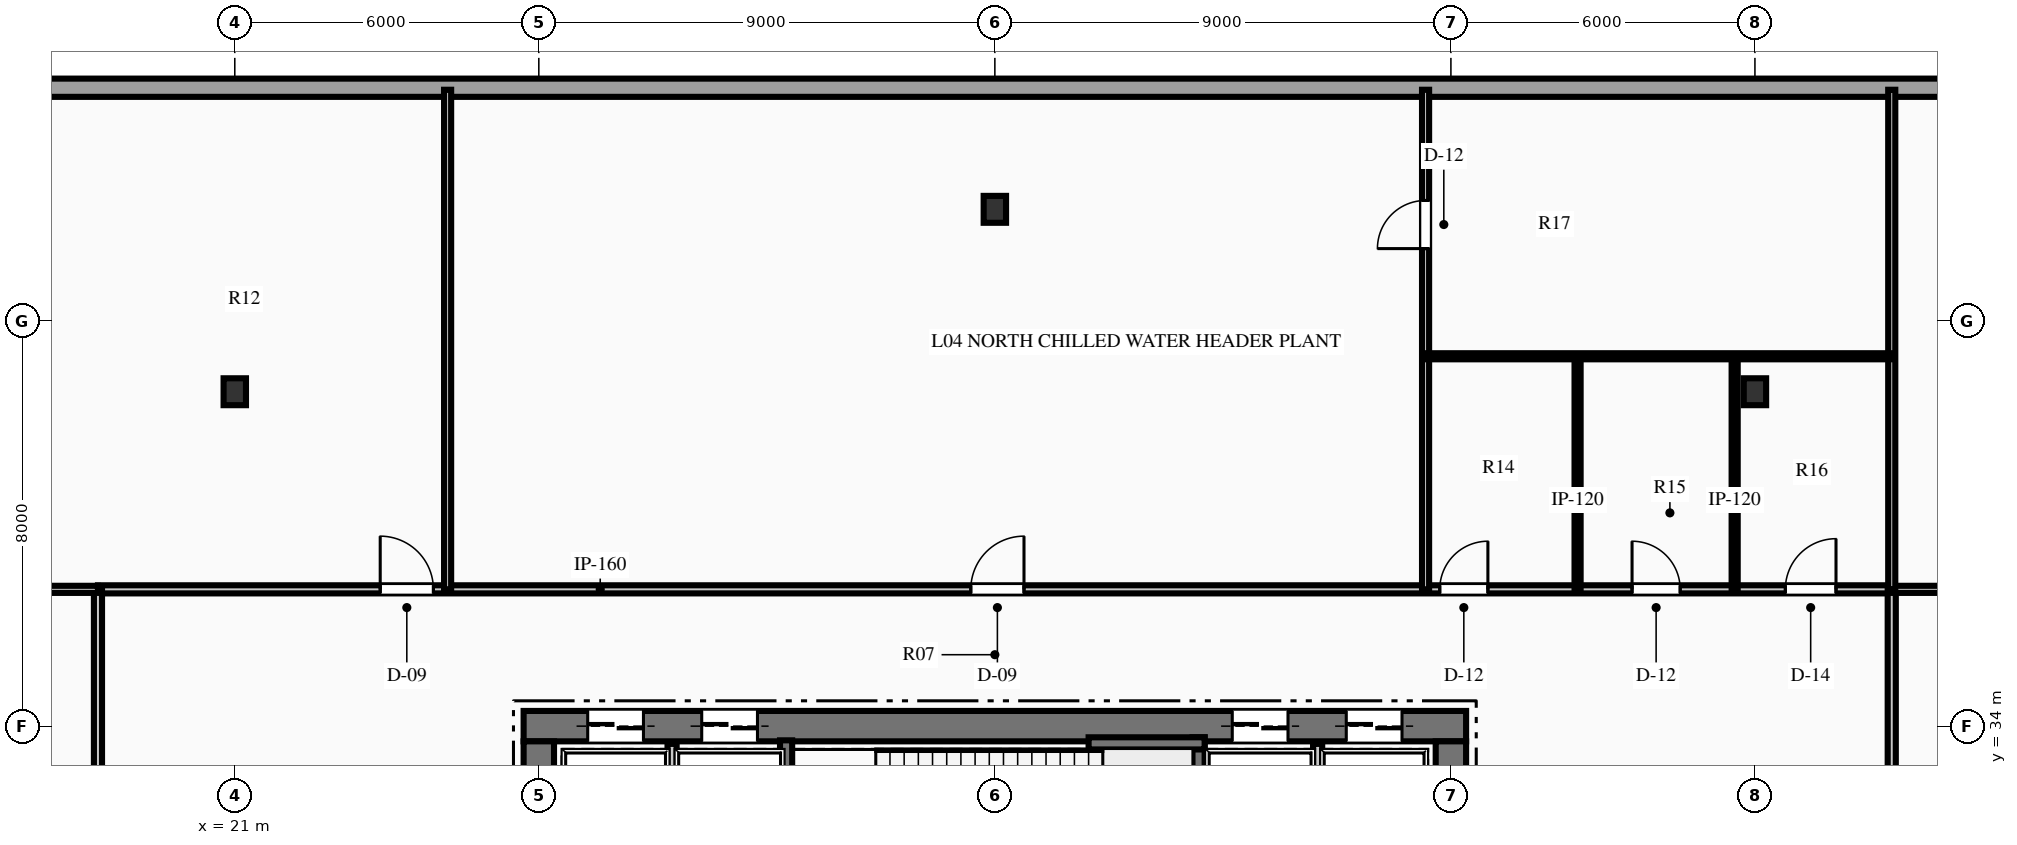
"""IFC4 building model, lengths in metres.
Left out: names, types, materials, properties, quantities, classifications, styles, units other than length and angle.
Written with IfcOpenShell. Run it as: python <this file> out.ifc"""

import sys

from ifc_helpers import new_model, si_unit, direction, frame, frame_2d, origin, origin_2d, place, context, subcontext, project, spatial, rectangle, i_section, extrude, element, fill, save


model = new_model("IFC4")
c1 = context("Model", 3, precision=1e-05, world=origin(), true_north=direction((0.0, 1.0)))
c2 = subcontext(c1, "Body", "Model", "MODEL_VIEW")
j1 = project(units=[si_unit("LENGTHUNIT", "METRE"), si_unit("PLANEANGLEUNIT", "RADIAN")], contexts=[c1])
p1 = place(None, origin())
s1 = spatial("IfcSite", under=j1, at=p1, CompositionType="ELEMENT")
p2 = place(p1, origin())
s2 = spatial("IfcBuilding", under=s1, at=p2, CompositionType="ELEMENT")
p3 = place(p2, frame((0.0, 0.0, 22.2)))
s3 = spatial("IfcBuildingStorey", under=s2, at=p3, CompositionType="ELEMENT", Elevation=22.2)
p4 = place(p3, frame((26.7, 34.0, 0.0), z_axis=(0.0, 0.0, 1.0), x_axis=(1.0, 0.0, 0.0)))
e1 = element("IfcWall", 1, at=p4, inside=s3, PredefinedType="SHEAR", context=c2, shape_type="SweptSolid", body=[
    extrude(rectangle(XDim=18.6, YDim=0.6, at=frame_2d((9.3, 0.0))), origin(), (0.0, 0.0, 1.0), 6.0),
])
p5 = place(p4, frame((1.265, 0.0, 0.0)))
e2 = element("IfcOpeningElement", 2, at=p5, cuts=e1, PredefinedType="OPENING", context=c2, shape_type="SweptSolid", body=[
    extrude(rectangle(XDim=1.1, YDim=2.15, at=frame_2d((0.55, 1.075))), frame((0.0, 0.31, 0.0), z_axis=(0.0, -1.0, 0.0), x_axis=(1.0, 0.0, 0.0)), (0.0, 0.0, 1.0), 0.62),
])
p6 = place(p4, frame((3.515, 0.0, 0.0)))
e3 = element("IfcOpeningElement", 3, at=p6, cuts=e1, PredefinedType="OPENING", context=c2, shape_type="SweptSolid", body=[
    extrude(rectangle(XDim=1.1, YDim=2.15, at=frame_2d((0.55, 1.075))), frame((0.0, 0.31, 0.0), z_axis=(0.0, -1.0, 0.0), x_axis=(1.0, 0.0, 0.0)), (0.0, 0.0, 1.0), 0.62),
])
p7 = place(p4, frame((13.985, 0.0, 0.0)))
e4 = element("IfcOpeningElement", 4, at=p7, cuts=e1, PredefinedType="OPENING", context=c2, shape_type="SweptSolid", body=[
    extrude(rectangle(XDim=1.1, YDim=2.15, at=frame_2d((0.55, 1.075))), frame((0.0, 0.31, 0.0), z_axis=(0.0, -1.0, 0.0), x_axis=(1.0, 0.0, 0.0)), (0.0, 0.0, 1.0), 0.62),
])
p8 = place(p4, frame((16.235, 0.0, 0.0)))
e5 = element("IfcOpeningElement", 5, at=p8, cuts=e1, PredefinedType="OPENING", context=c2, shape_type="SweptSolid", body=[
    extrude(rectangle(XDim=1.1, YDim=2.15, at=frame_2d((0.55, 1.075))), frame((0.0, 0.31, 0.0), z_axis=(0.0, -1.0, 0.0), x_axis=(1.0, 0.0, 0.0)), (0.0, 0.0, 1.0), 0.62),
])
p9 = place(p3, frame((27.0, 18.3, 0.0), z_axis=(0.0, 0.0, 1.0), x_axis=(0.0, 1.0, 0.0)))
e6 = element("IfcWall", 6, at=p9, inside=s3, PredefinedType="SHEAR", context=c2, shape_type="SweptSolid", body=[
    extrude(rectangle(XDim=15.4, YDim=0.6, at=frame_2d((7.7, 0.0))), origin(), (0.0, 0.0, 1.0), 6.0),
])
p10 = place(p9, frame((9.94, 0.0, 0.0)))
e7 = element("IfcOpeningElement", 7, at=p10, cuts=e6, PredefinedType="OPENING", context=c2, shape_type="SweptSolid", body=[
    extrude(rectangle(XDim=1.4, YDim=2.2, at=frame_2d((0.7, 1.1))), frame((0.0, 0.31, 0.0), z_axis=(0.0, -1.0, 0.0), x_axis=(1.0, 0.0, 0.0)), (0.0, 0.0, 1.0), 0.62),
])
p11 = place(p3, frame((45.0, 18.3, 0.0), z_axis=(0.0, 0.0, 1.0), x_axis=(0.0, 1.0, 0.0)))
e8 = element("IfcWall", 8, at=p11, inside=s3, PredefinedType="SHEAR", context=c2, shape_type="SweptSolid", body=[
    extrude(rectangle(XDim=15.4, YDim=0.6, at=frame_2d((7.7, 0.0))), origin(), (0.0, 0.0, 1.0), 6.0),
])
p12 = place(p11, frame((9.94, 0.0, 0.0)))
e9 = element("IfcOpeningElement", 9, at=p12, cuts=e8, PredefinedType="OPENING", context=c2, shape_type="SweptSolid", body=[
    extrude(rectangle(XDim=1.4, YDim=2.2, at=frame_2d((0.7, 1.1))), frame((0.0, 0.31, 0.0), z_axis=(0.0, -1.0, 0.0), x_axis=(1.0, 0.0, 0.0)), (0.0, 0.0, 1.0), 0.62),
])
p13 = place(p3, frame((31.88, 29.93, 0.0), z_axis=(0.0, 0.0, 1.0), x_axis=(0.0, 1.0, 0.0)))
e10 = element("IfcWall", 10, at=p13, inside=s3, PredefinedType="SHEAR", context=c2, shape_type="SweptSolid", body=[
    extrude(rectangle(XDim=3.79, YDim=0.24, at=frame_2d((1.895, 0.0))), origin(), (0.0, 0.0, 1.0), 6.0),
])
p14 = place(p3, frame((40.02, 29.93, 0.0), z_axis=(0.0, 0.0, 1.0), x_axis=(0.0, 1.0, 0.0)))
e11 = element("IfcWall", 11, at=p14, inside=s3, PredefinedType="SHEAR", context=c2, shape_type="SweptSolid", body=[
    extrude(rectangle(XDim=3.85, YDim=0.24, at=frame_2d((1.925, 0.0))), origin(), (0.0, 0.0, 1.0), 6.0),
])
p15 = place(p3, frame((37.85, 33.66, 0.0), z_axis=(0.0, 0.0, 1.0), x_axis=(1.0, 0.0, 0.0)))
e12 = element("IfcWall", 12, at=p15, inside=s3, PredefinedType="SHEAR", context=c2, shape_type="SweptSolid", body=[
    extrude(rectangle(XDim=2.29, YDim=0.24, at=frame_2d((1.145, 0.0))), origin(), (0.0, 0.0, 1.0), 6.0),
])
for number, where, z_axis, x_axis in (
    (13, (21.0, 40.6, 0.0), (0.0, 0.0, 1.0), (1.0, 0.0, 0.0)),
    (14, (51.0, 40.6, 0.0), (0.0, 0.0, 1.0), (1.0, 0.0, 0.0)),
    (15, (36.0, 44.2, 0.0), (0.0, 0.0, 1.0), (1.0, 0.0, 0.0)),
):
    element("IfcColumn", number, at=place(p3, frame(where, z_axis=z_axis, x_axis=x_axis)), inside=s3, PredefinedType="COLUMN", context=c2, shape_type="SweptSolid", body=[
        extrude(i_section(OverallWidth=0.442, OverallDepth=0.531, WebThickness=0.066, FlangeThickness=0.106, at=origin_2d()), origin(), (0.0, 0.0, 1.0), 6.0),
    ])
p16 = place(p3, frame((12.2, 46.6, 0.0), z_axis=(0.0, 0.0, 1.0), x_axis=(1.0, 0.0, 0.0)))
e16 = element("IfcWall", 16, at=p16, inside=s3, PredefinedType="STANDARD", context=c2, shape_type="SweptSolid", body=[
    extrude(rectangle(XDim=47.6, YDim=0.36, at=frame_2d((23.8, 0.0))), origin(), (0.0, 0.0, 1.0), 5.59),
])
for number, where, z_axis, x_axis in (
    (17, (29.63, 29.9, 0.0), (0.0, 0.0, 1.0), (0.0, 1.0, 0.0)),
    (18, (42.37, 29.9, 0.0), (0.0, 0.0, 1.0), (0.0, 1.0, 0.0)),
):
    element("IfcWall", number, at=place(p3, frame(where, z_axis=z_axis, x_axis=x_axis)), inside=s3, PredefinedType="PARTITIONING", context=c2, shape_type="SweptSolid", body=[
        extrude(rectangle(XDim=3.75, YDim=0.18, at=frame_2d((1.875, 0.0))), origin(), (0.0, 0.0, 1.0), 5.59),
    ])
p17 = place(p3, frame((18.3, 36.7, 0.0), z_axis=(0.0, 0.0, 1.0), x_axis=(1.0, 0.0, 0.0)))
e19 = element("IfcWall", 19, at=p17, inside=s3, PredefinedType="PARTITIONING", context=c2, shape_type="SweptSolid", body=[
    extrude(rectangle(XDim=35.4, YDim=0.16, at=frame_2d((17.7, 0.0))), origin(), (0.0, 0.0, 1.0), 5.59),
])
p18 = place(p17, frame((5.57, 0.0, 0.0)))
e20 = element("IfcOpeningElement", 20, at=p18, cuts=e19, PredefinedType="OPENING", context=c2, shape_type="SweptSolid", body=[
    extrude(rectangle(XDim=1.05, YDim=2.15, at=frame_2d((0.525, 1.075))), frame((0.0, 0.09, 0.0), z_axis=(0.0, -1.0, 0.0), x_axis=(1.0, 0.0, 0.0)), (0.0, 0.0, 1.0), 0.18),
])
p19 = place(p17, frame((17.225, 0.0, 0.0)))
e21 = element("IfcOpeningElement", 21, at=p19, cuts=e19, PredefinedType="OPENING", context=c2, shape_type="SweptSolid", body=[
    extrude(rectangle(XDim=1.05, YDim=2.15, at=frame_2d((0.525, 1.075))), frame((0.0, 0.09, 0.0), z_axis=(0.0, -1.0, 0.0), x_axis=(1.0, 0.0, 0.0)), (0.0, 0.0, 1.0), 0.18),
])
p20 = place(p17, frame((26.48, 0.0, 0.0)))
e22 = element("IfcOpeningElement", 22, at=p20, cuts=e19, PredefinedType="OPENING", context=c2, shape_type="SweptSolid", body=[
    extrude(rectangle(XDim=0.95, YDim=2.15, at=frame_2d((0.475, 1.075))), frame((0.0, 0.09, 0.0), z_axis=(0.0, -1.0, 0.0), x_axis=(1.0, 0.0, 0.0)), (0.0, 0.0, 1.0), 0.18),
])
p21 = place(p17, frame((30.275, 0.0, 0.0)))
e23 = element("IfcOpeningElement", 23, at=p21, cuts=e19, PredefinedType="OPENING", context=c2, shape_type="SweptSolid", body=[
    extrude(rectangle(XDim=0.95, YDim=2.15, at=frame_2d((0.475, 1.075))), frame((0.0, 0.09, 0.0), z_axis=(0.0, -1.0, 0.0), x_axis=(1.0, 0.0, 0.0)), (0.0, 0.0, 1.0), 0.18),
])
p22 = place(p17, frame((33.3, 0.0, 0.0)))
e24 = element("IfcOpeningElement", 24, at=p22, cuts=e19, PredefinedType="OPENING", context=c2, shape_type="SweptSolid", body=[
    extrude(rectangle(XDim=1.0, YDim=2.15, at=frame_2d((0.5, 1.075))), frame((0.0, 0.09, 0.0), z_axis=(0.0, -1.0, 0.0), x_axis=(1.0, 0.0, 0.0)), (0.0, 0.0, 1.0), 0.18),
])
for number, where, z_axis, x_axis in (
    (25, (18.3, 30.15, 0.0), (0.0, 0.0, 1.0), (0.0, 1.0, 0.0)),
    (26, (53.7, 30.15, 0.0), (0.0, 0.0, 1.0), (0.0, 1.0, 0.0)),
):
    element("IfcWall", number, at=place(p3, frame(where, z_axis=z_axis, x_axis=x_axis)), inside=s3, PredefinedType="PARTITIONING", context=c2, shape_type="SweptSolid", body=[
        extrude(rectangle(XDim=6.55, YDim=0.16, at=frame_2d((3.275, 0.0))), origin(), (0.0, 0.0, 1.0), 5.59),
    ])
p23 = place(p3, frame((9.04, 36.7, 0.0), z_axis=(0.0, 0.0, 1.0), x_axis=(1.0, 0.0, 0.0)))
e27 = element("IfcWall", 27, at=p23, inside=s3, PredefinedType="PARTITIONING", context=c2, shape_type="SweptSolid", body=[
    extrude(rectangle(XDim=9.26, YDim=0.14, at=frame_2d((4.63, 0.0))), origin(), (0.0, 0.0, 1.0), 4.889),
])
p24 = place(p3, frame((53.7, 36.7, 0.0), z_axis=(0.0, 0.0, 1.0), x_axis=(1.0, 0.0, 0.0)))
e28 = element("IfcWall", 28, at=p24, inside=s3, PredefinedType="PARTITIONING", context=c2, shape_type="SweptSolid", body=[
    extrude(rectangle(XDim=9.26, YDim=0.14, at=frame_2d((4.63, 0.0))), origin(), (0.0, 0.0, 1.0), 5.59),
])
p25 = place(p24, frame((2.025, 0.0, 0.0)))
e29 = element("IfcOpeningElement", 29, at=p25, cuts=e28, PredefinedType="OPENING", context=c2, shape_type="SweptSolid", body=[
    extrude(rectangle(XDim=0.95, YDim=2.15, at=frame_2d((0.475, 1.075))), frame((0.0, 0.08, 0.0), z_axis=(0.0, -1.0, 0.0), x_axis=(1.0, 0.0, 0.0)), (0.0, 0.0, 1.0), 0.16),
])
p26 = place(p3, frame((25.2, 36.7, 0.0), z_axis=(0.0, 0.0, 1.0), x_axis=(0.0, 1.0, 0.0)))
e30 = element("IfcWall", 30, at=p26, inside=s3, PredefinedType="PARTITIONING", context=c2, shape_type="SweptSolid", body=[
    extrude(rectangle(XDim=9.86, YDim=0.14, at=frame_2d((4.93, 0.0))), origin(), (0.0, 0.0, 1.0), 5.59),
])
p27 = place(p3, frame((44.5, 36.7, 0.0), z_axis=(0.0, 0.0, 1.0), x_axis=(0.0, 1.0, 0.0)))
e31 = element("IfcWall", 31, at=p27, inside=s3, PredefinedType="PARTITIONING", context=c2, shape_type="SweptSolid", body=[
    extrude(rectangle(XDim=9.86, YDim=0.14, at=frame_2d((4.93, 0.0))), origin(), (0.0, 0.0, 1.0), 5.59),
])
p28 = place(p27, frame((6.725, 0.0, 0.0)))
e32 = element("IfcOpeningElement", 32, at=p28, cuts=e31, PredefinedType="OPENING", context=c2, shape_type="SweptSolid", body=[
    extrude(rectangle(XDim=0.95, YDim=2.15, at=frame_2d((0.475, 1.075))), frame((0.0, 0.08, 0.0), z_axis=(0.0, -1.0, 0.0), x_axis=(1.0, 0.0, 0.0)), (0.0, 0.0, 1.0), 0.16),
])
p29 = place(p3, frame((53.7, 36.7, 0.0), z_axis=(0.0, 0.0, 1.0), x_axis=(0.0, 1.0, 0.0)))
e33 = element("IfcWall", 33, at=p29, inside=s3, PredefinedType="PARTITIONING", context=c2, shape_type="SweptSolid", body=[
    extrude(rectangle(XDim=9.86, YDim=0.14, at=frame_2d((4.93, 0.0))), origin(), (0.0, 0.0, 1.0), 5.59),
])
for number, where, z_axis, x_axis in (
    (34, (47.5, 36.7, 0.0), (0.0, 0.0, 1.0), (0.0, 1.0, 0.0)),
    (35, (50.6, 36.7, 0.0), (0.0, 0.0, 1.0), (0.0, 1.0, 0.0)),
):
    element("IfcWall", number, at=place(p3, frame(where, z_axis=z_axis, x_axis=x_axis)), inside=s3, PredefinedType="PARTITIONING", context=c2, shape_type="SweptSolid", body=[
        extrude(rectangle(XDim=4.6, YDim=0.12, at=frame_2d((2.3, 0.0))), origin(), (0.0, 0.0, 1.0), 5.59),
    ])
p30 = place(p3, frame((44.5, 41.3, 0.0), z_axis=(0.0, 0.0, 1.0), x_axis=(1.0, 0.0, 0.0)))
e36 = element("IfcWall", 36, at=p30, inside=s3, PredefinedType="PARTITIONING", context=c2, shape_type="SweptSolid", body=[
    extrude(rectangle(XDim=9.2, YDim=0.12, at=frame_2d((4.6, 0.0))), origin(), (0.0, 0.0, 1.0), 5.59),
])
p31 = place(p18, origin())
e37 = element("IfcDoor", 37, at=p31, inside=s3, OperationType="SINGLE_SWING_LEFT", PredefinedType="DOOR", context=c2, shape_type="SweptSolid", body=[
    extrude(rectangle(XDim=1.05, YDim=2.15, at=frame_2d((0.525, 1.075))), frame((0.0, 0.025, 0.0), z_axis=(0.0, -1.0, 0.0), x_axis=(1.0, 0.0, 0.0)), (0.0, 0.0, 1.0), 0.05),
])
fill(e20, e37)
p32 = place(p19, origin())
e38 = element("IfcDoor", 38, at=p32, inside=s3, OperationType="SINGLE_SWING_RIGHT", PredefinedType="DOOR", context=c2, shape_type="SweptSolid", body=[
    extrude(rectangle(XDim=1.05, YDim=2.15, at=frame_2d((0.525, 1.075))), frame((0.0, 0.025, 0.0), z_axis=(0.0, -1.0, 0.0), x_axis=(1.0, 0.0, 0.0)), (0.0, 0.0, 1.0), 0.05),
])
fill(e21, e38)
p33 = place(p28, origin())
e39 = element("IfcDoor", 39, at=p33, inside=s3, OperationType="SINGLE_SWING_LEFT", PredefinedType="DOOR", context=c2, shape_type="SweptSolid", body=[
    extrude(rectangle(XDim=0.95, YDim=2.15, at=frame_2d((0.475, 1.075))), frame((0.0, 0.025, 0.0), z_axis=(0.0, -1.0, 0.0), x_axis=(1.0, 0.0, 0.0)), (0.0, 0.0, 1.0), 0.05),
])
fill(e32, e39)
p34 = place(p20, origin())
e40 = element("IfcDoor", 40, at=p34, inside=s3, OperationType="SINGLE_SWING_RIGHT", PredefinedType="DOOR", context=c2, shape_type="SweptSolid", body=[
    extrude(rectangle(XDim=0.95, YDim=2.15, at=frame_2d((0.475, 1.075))), frame((0.0, 0.025, 0.0), z_axis=(0.0, -1.0, 0.0), x_axis=(1.0, 0.0, 0.0)), (0.0, 0.0, 1.0), 0.05),
])
fill(e22, e40)
p35 = place(p21, origin())
e41 = element("IfcDoor", 41, at=p35, inside=s3, OperationType="SINGLE_SWING_LEFT", PredefinedType="DOOR", context=c2, shape_type="SweptSolid", body=[
    extrude(rectangle(XDim=0.95, YDim=2.15, at=frame_2d((0.475, 1.075))), frame((0.0, 0.025, 0.0), z_axis=(0.0, -1.0, 0.0), x_axis=(1.0, 0.0, 0.0)), (0.0, 0.0, 1.0), 0.05),
])
fill(e23, e41)
p36 = place(p22, origin())
e42 = element("IfcDoor", 42, at=p36, inside=s3, OperationType="SINGLE_SWING_RIGHT", PredefinedType="DOOR", context=c2, shape_type="SweptSolid", body=[
    extrude(rectangle(XDim=1.0, YDim=2.15, at=frame_2d((0.5, 1.075))), frame((0.0, 0.025, 0.0), z_axis=(0.0, -1.0, 0.0), x_axis=(1.0, 0.0, 0.0)), (0.0, 0.0, 1.0), 0.05),
])
fill(e24, e42)
p37 = place(p5, origin())
e43 = element("IfcDoor", 43, at=p37, inside=s3, OperationType="SLIDING_TO_LEFT", PredefinedType="DOOR", context=c2, shape_type="SweptSolid", body=[
    extrude(rectangle(XDim=1.1, YDim=2.15, at=frame_2d((0.55, 1.075))), frame((0.0, 0.025, 0.0), z_axis=(0.0, -1.0, 0.0), x_axis=(1.0, 0.0, 0.0)), (0.0, 0.0, 1.0), 0.05),
])
fill(e2, e43)
p38 = place(p6, origin())
e44 = element("IfcDoor", 44, at=p38, inside=s3, OperationType="SLIDING_TO_LEFT", PredefinedType="DOOR", context=c2, shape_type="SweptSolid", body=[
    extrude(rectangle(XDim=1.1, YDim=2.15, at=frame_2d((0.55, 1.075))), frame((0.0, 0.025, 0.0), z_axis=(0.0, -1.0, 0.0), x_axis=(1.0, 0.0, 0.0)), (0.0, 0.0, 1.0), 0.05),
])
fill(e3, e44)
p39 = place(p7, origin())
e45 = element("IfcDoor", 45, at=p39, inside=s3, OperationType="SLIDING_TO_LEFT", PredefinedType="DOOR", context=c2, shape_type="SweptSolid", body=[
    extrude(rectangle(XDim=1.1, YDim=2.15, at=frame_2d((0.55, 1.075))), frame((0.0, 0.025, 0.0), z_axis=(0.0, -1.0, 0.0), x_axis=(1.0, 0.0, 0.0)), (0.0, 0.0, 1.0), 0.05),
])
fill(e4, e45)
p40 = place(p8, origin())
e46 = element("IfcDoor", 46, at=p40, inside=s3, OperationType="SLIDING_TO_LEFT", PredefinedType="DOOR", context=c2, shape_type="SweptSolid", body=[
    extrude(rectangle(XDim=1.1, YDim=2.15, at=frame_2d((0.55, 1.075))), frame((0.0, 0.025, 0.0), z_axis=(0.0, -1.0, 0.0), x_axis=(1.0, 0.0, 0.0)), (0.0, 0.0, 1.0), 0.05),
])
fill(e5, e46)
save(model, sys.argv[1])
